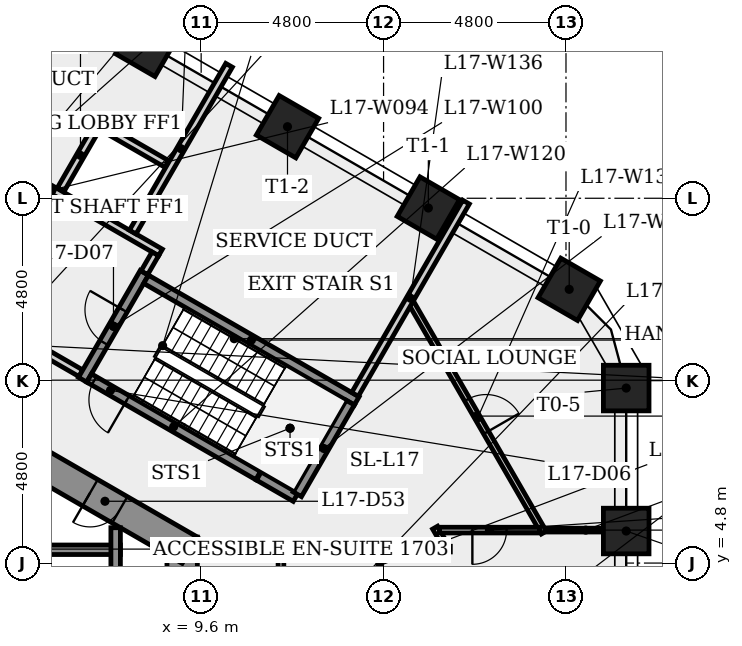
"""IFC4 building model, lengths in metres.
Left out: names, types, materials, properties, quantities, classifications, styles, units other than length and angle.
Written with IfcOpenShell. Run it as: python <this file> out.ifc"""

import sys

from ifc_helpers import new_model, si_unit, direction, frame, frame_2d, origin, origin_2d, place, context, subcontext, project, spatial, rectangle, extrude, element, fill, save


model = new_model("IFC4")
c1 = context("Model", 3, precision=1e-05, world=origin(), true_north=direction((0.0, 1.0)))
c2 = subcontext(c1, "Body", "Model", "MODEL_VIEW")
j1 = project(units=[si_unit("LENGTHUNIT", "METRE"), si_unit("PLANEANGLEUNIT", "RADIAN")], contexts=[c1])
p1 = place(None, origin())
s1 = spatial("IfcSite", under=j1, at=p1, CompositionType="ELEMENT")
p2 = place(p1, origin())
s2 = spatial("IfcBuilding", under=s1, at=p2, CompositionType="ELEMENT")
p3 = place(p2, frame((0.0, 0.0, 66.3)))
s3 = spatial("IfcBuildingStorey", under=s2, at=p3, CompositionType="ELEMENT", Elevation=66.3)
p4 = place(p3, frame((9.1, -5.485, 0.0), z_axis=(0.0, 0.0, 1.0), x_axis=(0.0, 1.0, 0.0)))
e1 = element("IfcWall", 1, at=p4, inside=s3, PredefinedType="SHEAR", context=c2, shape_type="SweptSolid", body=[
    extrude(rectangle(XDim=10.97, YDim=0.8, at=frame_2d((5.485, 0.0))), origin(), (0.0, 0.0, 1.0), 4.0),
])
p5 = place(p4, frame((4.685, 0.0, 0.0)))
e2 = element("IfcOpeningElement", 2, at=p5, cuts=e1, PredefinedType="OPENING", context=c2, shape_type="SweptSolid", body=[
    extrude(rectangle(XDim=1.6, YDim=2.1, at=frame_2d((0.8, 1.05))), frame((0.0, 0.41, 0.0), z_axis=(0.0, -1.0, 0.0), x_axis=(1.0, 0.0, 0.0)), (0.0, 0.0, 1.0), 0.82),
])
p6 = place(p3, frame((9.3, 5.138, 0.0), z_axis=(0.0, 0.0, 1.0), x_axis=(-0.866023993627, 0.500002442456, 0.0)))
e3 = element("IfcWall", 3, at=p6, inside=s3, PredefinedType="SHEAR", context=c2, shape_type="SweptSolid", body=[
    extrude(rectangle(XDim=10.97, YDim=0.8, at=frame_2d((5.485, 0.0))), origin(), (0.0, 0.0, 1.0), 4.0),
])
p7 = place(p6, frame((8.21, 0.0, 0.0)))
e4 = element("IfcOpeningElement", 4, at=p7, cuts=e3, PredefinedType="OPENING", context=c2, shape_type="SweptSolid", body=[
    extrude(rectangle(XDim=0.9, YDim=2.1, at=frame_2d((0.45, 1.05))), frame((0.0, 0.41, 0.0), z_axis=(0.0, -1.0, 0.0), x_axis=(1.0, 0.0, 0.0)), (0.0, 0.0, 1.0), 0.82),
])
p8 = place(p6, frame((2.126, 0.0, 0.0)))
e5 = element("IfcOpeningElement", 5, at=p8, cuts=e3, PredefinedType="OPENING", context=c2, shape_type="SweptSolid", body=[
    extrude(rectangle(XDim=0.9, YDim=2.1, at=frame_2d((0.45, 1.05))), frame((0.0, 0.41, 0.0), z_axis=(0.0, -1.0, 0.0), x_axis=(1.0, 0.0, 0.0)), (0.0, 0.0, 1.0), 0.82),
])
for number, where, z_axis, x_axis in (
    (6, (20.785, 5.643, 0.0), (0.0, 0.0, 1.0), (1.0, 0.0, 0.0)),
    (7, (20.785, 9.405, 0.0), (0.0, 0.0, 1.0), (1.0, 0.0, 0.0)),
    (8, (19.285, 12.003, 0.0), (0.0, 0.0, 1.0), (0.5, 0.866, 0.0)),
    (9, (15.578, 14.143, 0.0), (0.0, 0.0, 1.0), (0.5, 0.866, 0.0)),
    (10, (11.872, 16.283, 0.0), (0.0, 0.0, 1.0), (0.5, 0.866, 0.0)),
    (11, (8.166, 18.423, 0.0), (0.0, 0.0, 1.0), (0.5, 0.866, 0.0)),
):
    element("IfcColumn", number, at=place(p3, frame(where, z_axis=z_axis, x_axis=x_axis)), inside=s3, PredefinedType="COLUMN", context=c2, shape_type="SweptSolid", body=[
        extrude(rectangle(XDim=1.2, YDim=1.2, at=origin_2d()), origin(), (0.0, 0.0, 1.0), 4.0),
    ])
p9 = place(p3, frame((-7.225, 5.15, 0.0), z_axis=(0.0, 0.0, 1.0), x_axis=(1.0, 0.0, 0.0)))
e12 = element("IfcWall", 12, at=p9, inside=s3, PredefinedType="SHEAR", context=c2, shape_type="SweptSolid", body=[
    extrude(rectangle(XDim=14.7, YDim=0.25, at=frame_2d((7.35, 0.0))), origin(), (0.0, 0.0, 1.0), 3.6),
])
p10 = place(p3, frame((4.459, 15.323, 0.0), z_axis=(0.0, 0.0, 1.0), x_axis=(0.866016039709, -0.500016218704, 0.0)))
e13 = element("IfcWall", 13, at=p10, inside=s3, PredefinedType="PLUMBINGWALL", context=c2, shape_type="SweptSolid", body=[
    extrude(rectangle(XDim=4.7, YDim=0.2, at=frame_2d((2.35, 0.0))), origin(), (0.0, 0.0, 1.0), 3.6),
])
p11 = place(p3, frame((6.435, 9.795, 0.0), z_axis=(0.0, 0.0, 1.0), x_axis=(-0.866012907634, 0.500021643343, 0.0)))
e14 = element("IfcWall", 14, at=p11, inside=s3, PredefinedType="PARTITIONING", context=c2, shape_type="SweptSolid", body=[
    extrude(rectangle(XDim=4.45, YDim=0.2, at=frame_2d((2.225, 0.0))), origin(), (0.0, 0.0, 1.0), 3.6),
])
p12 = place(p11, frame((1.675, 0.0, 0.0)))
e15 = element("IfcOpeningElement", 15, at=p12, cuts=e14, PredefinedType="OPENING", context=c2, shape_type="SweptSolid", body=[
    extrude(rectangle(XDim=1.1, YDim=2.1, at=frame_2d((0.55, 1.05))), frame((0.0, 0.11, 0.0), z_axis=(0.0, -1.0, 0.0), x_axis=(1.0, 0.0, 0.0)), (0.0, 0.0, 1.0), 0.22),
])
p13 = place(p3, frame((6.48, 9.624, 0.0), z_axis=(0.0, 0.0, 1.0), x_axis=(0.500017246033, 0.866015446554, 0.0)))
e16 = element("IfcWall", 16, at=p13, inside=s3, PredefinedType="SHEAR", context=c2, shape_type="SweptSolid", body=[
    extrude(rectangle(XDim=3.25, YDim=0.25, at=frame_2d((1.625, 0.0))), origin(), (0.0, 0.0, 1.0), 3.6),
])
p14 = place(p13, frame((1.125, 0.0, 0.0)))
e17 = element("IfcOpeningElement", 17, at=p14, cuts=e16, PredefinedType="OPENING", context=c2, shape_type="SweptSolid", body=[
    extrude(rectangle(XDim=1.0, YDim=2.1, at=frame_2d((0.5, 1.05))), frame((0.0, 0.135, 0.0), z_axis=(0.0, -1.0, 0.0), x_axis=(1.0, 0.0, 0.0)), (0.0, 0.0, 1.0), 0.27),
])
p15 = place(p3, frame((7.35, 5.73, 0.0), z_axis=(0.0, 0.0, 1.0), x_axis=(0.0, -1.0, 0.0)))
e18 = element("IfcWall", 18, at=p15, inside=s3, PredefinedType="SHEAR", context=c2, shape_type="SweptSolid", body=[
    extrude(rectangle(XDim=3.805, YDim=0.25, at=frame_2d((1.903, 0.0))), origin(), (0.0, 0.0, 1.0), 3.6),
])
p16 = place(p3, frame((7.8, 13.51, 0.0), z_axis=(0.0, 0.0, 1.0), x_axis=(0.499993479487, 0.866029168372, 0.0)))
e19 = element("IfcWall", 19, at=p16, inside=s3, PredefinedType="PLUMBINGWALL", context=c2, shape_type="SweptSolid", body=[
    extrude(rectangle(XDim=5.068, YDim=0.2, at=frame_2d((2.534, 0.0))), origin(), (0.0, 0.0, 1.0), 3.6),
])
p17 = place(p3, frame((8.151, 12.268, 0.0), z_axis=(0.0, 0.0, 1.0), x_axis=(0.866025499775, -0.499999833739, 0.0)))
e20 = element("IfcWall", 20, at=p17, inside=s3, PredefinedType="SHEAR", context=c2, shape_type="SweptSolid", body=[
    extrude(rectangle(XDim=6.4, YDim=0.25, at=frame_2d((3.2, 0.0))), origin(), (0.0, 0.0, 1.0), 3.6),
])
p18 = place(p3, frame((8.393, 12.937, 0.0), z_axis=(0.0, 0.0, 1.0), x_axis=(-0.500065409566, -0.86598763626, 0.0)))
e21 = element("IfcWall", 21, at=p18, inside=s3, PredefinedType="PLUMBINGWALL", context=c2, shape_type="SweptSolid", body=[
    extrude(rectangle(XDim=0.575, YDim=0.2, at=frame_2d((0.288, 0.0))), origin(), (0.0, 0.0, 1.0), 3.6),
])
p19 = place(p3, frame((11.1, 7.101, 0.0), z_axis=(0.0, 0.0, 1.0), x_axis=(-0.8660265141, 0.499998076872, 0.0)))
e22 = element("IfcWall", 22, at=p19, inside=s3, PredefinedType="SHEAR", context=c2, shape_type="SweptSolid", body=[
    extrude(rectangle(XDim=5.137, YDim=0.25, at=frame_2d((2.569, 0.0))), origin(), (0.0, 0.0, 1.0), 3.6),
])
p20 = place(p19, frame((3.987, 0.0, 0.0)))
e23 = element("IfcOpeningElement", 23, at=p20, cuts=e22, PredefinedType="OPENING", context=c2, shape_type="SweptSolid", body=[
    extrude(rectangle(XDim=1.0, YDim=2.1, at=frame_2d((0.5, 1.05))), frame((0.0, 0.135, 0.0), z_axis=(0.0, -1.0, 0.0), x_axis=(1.0, 0.0, 0.0)), (0.0, 0.0, 1.0), 0.27),
])
p21 = place(p3, frame((11.7, -5.592, 0.0), z_axis=(0.0, 0.0, 1.0), x_axis=(0.0, 1.0, 0.0)))
e24 = element("IfcWall", 24, at=p21, inside=s3, PredefinedType="PARTITIONING", context=c2, shape_type="SweptSolid", body=[
    extrude(rectangle(XDim=10.835, YDim=0.15, at=frame_2d((5.417, 0.0))), origin(), (0.0, 0.0, 1.0), 3.6),
])
p22 = place(p21, frame((6.181, 0.0, 0.0)))
e25 = element("IfcOpeningElement", 25, at=p22, cuts=e24, PredefinedType="OPENING", context=c2, shape_type="SweptSolid", body=[
    extrude(rectangle(XDim=0.9, YDim=2.1, at=frame_2d((0.45, 1.05))), frame((0.0, 0.085, 0.0), z_axis=(0.0, -1.0, 0.0), x_axis=(1.0, 0.0, 0.0)), (0.0, 0.0, 1.0), 0.17),
])
p23 = place(p3, frame((12.085, 6.532, 0.0), z_axis=(0.0, 0.0, 1.0), x_axis=(-0.86604373436, 0.499968249168, 0.0)))
e26 = element("IfcWall", 26, at=p23, inside=s3, PredefinedType="SHEAR", context=c2, shape_type="SweptSolid", body=[
    extrude(rectangle(XDim=1.118, YDim=0.25, at=frame_2d((0.559, 0.0))), origin(), (0.0, 0.0, 1.0), 3.6),
])
p24 = place(p3, frame((13.523, 9.022, 0.0), z_axis=(0.0, 0.0, 1.0), x_axis=(-0.500013277472, -0.866017737897, 0.0)))
e27 = element("IfcWall", 27, at=p24, inside=s3, PredefinedType="SHEAR", context=c2, shape_type="SweptSolid", body=[
    extrude(rectangle(XDim=2.786, YDim=0.25, at=frame_2d((1.393, 0.0))), origin(), (0.0, 0.0, 1.0), 3.6),
])
p25 = place(p3, frame((14.3, 3.639, 0.0), z_axis=(0.0, 0.0, 1.0), x_axis=(0.0, 1.0, 0.0)))
e28 = element("IfcWall", 28, at=p25, inside=s3, PredefinedType="PARTITIONING", context=c2, shape_type="SweptSolid", body=[
    extrude(rectangle(XDim=1.453, YDim=0.1, at=frame_2d((0.727, 0.0))), origin(), (0.0, 0.0, 1.0), 3.6),
])
p26 = place(p3, frame((11.775, 5.167, 0.0), z_axis=(0.0, 0.0, 1.0), x_axis=(1.0, 0.0, 0.0)))
e29 = element("IfcWall", 29, at=p26, inside=s3, PredefinedType="PARTITIONING", context=c2, shape_type="SweptSolid", body=[
    extrude(rectangle(XDim=4.382, YDim=0.15, at=frame_2d((2.191, 0.0))), origin(), (0.0, 0.0, 1.0), 3.6),
])
p27 = place(p3, frame((15.133, 11.638, 0.0), z_axis=(0.0, 0.0, 1.0), x_axis=(0.500004447669, -0.866022835906, 0.0)))
e30 = element("IfcWall", 30, at=p27, inside=s3, PredefinedType="PARTITIONING", context=c2, shape_type="SweptSolid", body=[
    extrude(rectangle(XDim=6.97, YDim=0.15, at=frame_2d((3.485, 0.0))), origin(), (0.0, 0.0, 1.0), 3.6),
])
p28 = place(p27, frame((2.93, 0.0, 0.0)))
e31 = element("IfcOpeningElement", 31, at=p28, cuts=e30, PredefinedType="OPENING", context=c2, shape_type="SweptSolid", body=[
    extrude(rectangle(XDim=1.0, YDim=2.1, at=frame_2d((0.5, 1.05))), frame((0.0, 0.085, 0.0), z_axis=(0.0, -1.0, 0.0), x_axis=(1.0, 0.0, 0.0)), (0.0, 0.0, 1.0), 0.17),
])
p29 = place(p3, frame((13.648, 9.239, 0.0), z_axis=(0.0, 0.0, 1.0), x_axis=(0.499990086032, 0.866031127541, 0.0)))
e32 = element("IfcWall", 32, at=p29, inside=s3, PredefinedType="PLUMBINGWALL", context=c2, shape_type="SweptSolid", body=[
    extrude(rectangle(XDim=5.843, YDim=0.2, at=frame_2d((2.922, 0.0))), origin(), (0.0, 0.0, 1.0), 3.6),
])
p30 = place(p3, frame((15.756, 5.732, 0.0), z_axis=(0.0, 0.0, 1.0), x_axis=(0.500186019832, -0.865917978543, 0.0)))
e33 = element("IfcWall", 33, at=p30, inside=s3, PredefinedType="PARTITIONING", context=c2, shape_type="SweptSolid", body=[
    extrude(rectangle(XDim=0.577, YDim=0.15, at=frame_2d((0.289, 0.0))), origin(), (0.0, 0.0, 1.0), 3.6),
])
p31 = place(p3, frame((18.655, 5.667, 0.0), z_axis=(0.0, 0.0, 1.0), x_axis=(1.0, 0.0, 0.0)))
e34 = element("IfcWall", 34, at=p31, inside=s3, PredefinedType="PARTITIONING", context=c2, shape_type="SweptSolid", body=[
    extrude(rectangle(XDim=2.129, YDim=0.1, at=frame_2d((1.065, 0.0))), origin(), (0.0, 0.0, 1.0), 3.6),
])
p32 = place(p3, frame((18.505, 5.667, 0.0), z_axis=(0.0, 0.0, 1.0), x_axis=(-1.0, 0.0, 0.0)))
e35 = element("IfcWall", 35, at=p32, inside=s3, PredefinedType="PARTITIONING", context=c2, shape_type="SweptSolid", body=[
    extrude(rectangle(XDim=2.637, YDim=0.15, at=frame_2d((1.319, 0.0))), origin(), (0.0, 0.0, 1.0), 3.6),
])
p33 = place(p32, frame((0.869, 0.0, 0.0)))
e36 = element("IfcOpeningElement", 36, at=p33, cuts=e35, PredefinedType="OPENING", context=c2, shape_type="SweptSolid", body=[
    extrude(rectangle(XDim=0.9, YDim=2.1, at=frame_2d((0.45, 1.05))), frame((0.0, 0.085, 0.0), z_axis=(0.0, -1.0, 0.0), x_axis=(1.0, 0.0, 0.0)), (0.0, 0.0, 1.0), 0.17),
])
p34 = place(p3, frame((5.905, 14.627, 0.0), z_axis=(0.0, 0.0, 1.0), x_axis=(0.499888406853, 0.866089822532, 0.0)))
e37 = element("IfcWall", 37, at=p34, inside=s3, PredefinedType="PLUMBINGWALL", context=c2, shape_type="SweptSolid", body=[
    extrude(rectangle(XDim=2.08, YDim=0.2, at=frame_2d((1.04, 0.0))), origin(), (0.0, 0.0, 1.0), 3.6),
])
p35 = place(p3, frame((6.981, 16.292, 0.0), z_axis=(0.0, 0.0, 1.0), x_axis=(0.866041862775, -0.499971491109, 0.0)))
e38 = element("IfcWall", 38, at=p35, inside=s3, PredefinedType="PLUMBINGWALL", context=c2, shape_type="SweptSolid", body=[
    extrude(rectangle(XDim=1.98, YDim=0.2, at=frame_2d((0.99, 0.0))), origin(), (0.0, 0.0, 1.0), 3.6),
])
p36 = place(p20, origin())
e39 = element("IfcDoor", 39, at=p36, inside=s3, OperationType="SINGLE_SWING_LEFT", PredefinedType="DOOR", context=c2, shape_type="SweptSolid", body=[
    extrude(rectangle(XDim=1.0, YDim=2.1, at=frame_2d((0.5, 1.05))), frame((0.0, 0.025, 0.0), z_axis=(0.0, -1.0, 0.0), x_axis=(1.0, 0.0, 0.0)), (0.0, 0.0, 1.0), 0.05),
])
fill(e23, e39)
p37 = place(p14, origin())
e40 = element("IfcDoor", 40, at=p37, inside=s3, OperationType="SINGLE_SWING_RIGHT", PredefinedType="DOOR", context=c2, shape_type="SweptSolid", body=[
    extrude(rectangle(XDim=1.0, YDim=2.1, at=frame_2d((0.5, 1.05))), frame((0.0, 0.025, 0.0), z_axis=(0.0, -1.0, 0.0), x_axis=(1.0, 0.0, 0.0)), (0.0, 0.0, 1.0), 0.05),
])
fill(e17, e40)
p38 = place(p33, origin())
e41 = element("IfcDoor", 41, at=p38, inside=s3, OperationType="SINGLE_SWING_RIGHT", PredefinedType="DOOR", context=c2, shape_type="SweptSolid", body=[
    extrude(rectangle(XDim=0.9, YDim=2.1, at=frame_2d((0.45, 1.05))), frame((0.0, 0.025, 0.0), z_axis=(0.0, -1.0, 0.0), x_axis=(1.0, 0.0, 0.0)), (0.0, 0.0, 1.0), 0.05),
])
fill(e36, e41)
p39 = place(p28, origin())
e42 = element("IfcDoor", 42, at=p39, inside=s3, OperationType="SINGLE_SWING_RIGHT", PredefinedType="DOOR", context=c2, shape_type="SweptSolid", body=[
    extrude(rectangle(XDim=1.0, YDim=2.1, at=frame_2d((0.5, 1.05))), frame((0.0, 0.025, 0.0), z_axis=(0.0, -1.0, 0.0), x_axis=(1.0, 0.0, 0.0)), (0.0, 0.0, 1.0), 0.05),
])
fill(e31, e42)
p40 = place(p8, origin())
e43 = element("IfcDoor", 43, at=p40, inside=s3, OperationType="SINGLE_SWING_RIGHT", PredefinedType="DOOR", context=c2, shape_type="SweptSolid", body=[
    extrude(rectangle(XDim=0.9, YDim=2.1, at=frame_2d((0.45, 1.05))), frame((0.0, 0.025, 0.0), z_axis=(0.0, -1.0, 0.0), x_axis=(1.0, 0.0, 0.0)), (0.0, 0.0, 1.0), 0.05),
])
fill(e5, e43)
save(model, sys.argv[1])
